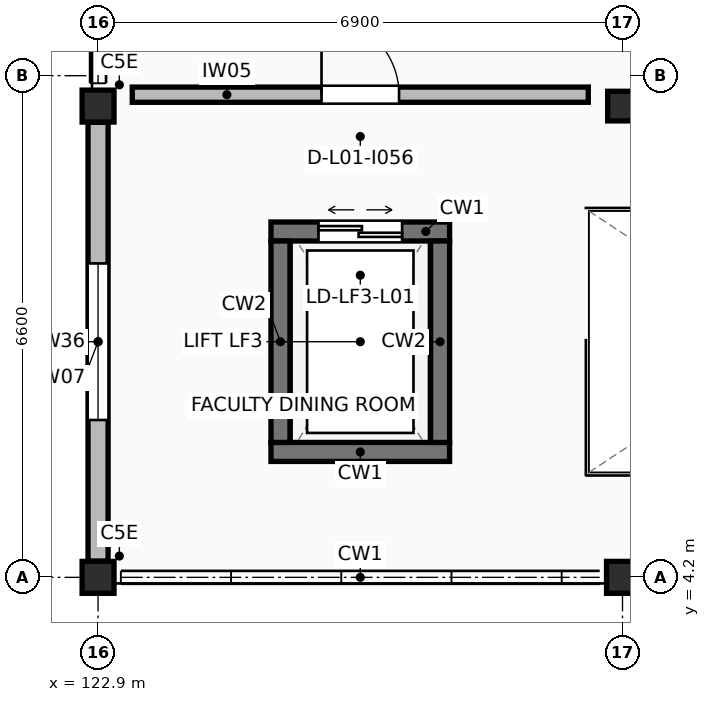
"""IFC4 building model, lengths in metres.
Left out: names, types, materials, properties, quantities, classifications, styles, units other than length and angle.
Written with IfcOpenShell. Run it as: python <this file> out.ifc"""

import sys

from ifc_helpers import new_model, si_unit, direction, frame, frame_2d, origin, origin_2d, place, context, subcontext, project, spatial, rectangle, extrude, element, fill, save


model = new_model("IFC4")
c1 = context("Model", 3, precision=1e-05, world=origin(), true_north=direction((0.0, 1.0)))
c2 = subcontext(c1, "Body", "Model", "MODEL_VIEW")
j1 = project(units=[si_unit("LENGTHUNIT", "METRE"), si_unit("PLANEANGLEUNIT", "RADIAN")], contexts=[c1])
p1 = place(None, origin())
s1 = spatial("IfcSite", under=j1, at=p1, CompositionType="ELEMENT")
p2 = place(p1, origin())
s2 = spatial("IfcBuilding", under=s1, at=p2, CompositionType="ELEMENT")
p3 = place(p2, frame((0.0, 0.0, 4.42)))
s3 = spatial("IfcBuildingStorey", under=s2, at=p3, CompositionType="ELEMENT", Elevation=4.42)
for number, where, z_axis, x_axis in (
    (1, (122.9, 4.2, 0.0), (0.0, 0.0, 1.0), (1.0, 0.0, 0.0)),
    (2, (122.9, 10.4, 0.0), (0.0, 0.0, 1.0), (1.0, 0.0, 0.0)),
    (3, (129.8, 4.2, 0.0), (0.0, 0.0, 1.0), (1.0, 0.0, 0.0)),
):
    element("IfcColumn", number, at=place(p3, frame(where, z_axis=z_axis, x_axis=x_axis)), inside=s3, PredefinedType="COLUMN", context=c2, shape_type="SweptSolid", body=[
        extrude(rectangle(XDim=0.42, YDim=0.42, at=origin_2d()), origin(), (0.0, 0.0, 1.0), 3.74),
    ])
p4 = place(p3, frame((129.8, 10.4, 0.0), z_axis=(0.0, 0.0, 1.0), x_axis=(1.0, 0.0, 0.0)))
e4 = element("IfcColumn", 4, at=p4, inside=s3, PredefinedType="COLUMN", context=c2, shape_type="SweptSolid", body=[
    extrude(rectangle(XDim=0.39, YDim=0.39, at=origin_2d()), origin(), (0.0, 0.0, 1.0), 3.74),
])
p5 = place(p3, frame((125.175, 8.75, 0.0), z_axis=(0.0, 0.0, 1.0), x_axis=(1.0, 0.0, 0.0)))
e5 = element("IfcWall", 5, at=p5, inside=s3, PredefinedType="SHEAR", context=c2, shape_type="SweptSolid", body=[
    extrude(rectangle(XDim=2.35, YDim=0.25, at=frame_2d((1.175, 0.0))), origin(), (0.0, 0.0, 1.0), 3.49),
])
p6 = place(p5, frame((0.625, 0.0, 0.0)))
e6 = element("IfcOpeningElement", 6, at=p6, cuts=e5, PredefinedType="OPENING", context=c2, shape_type="SweptSolid", body=[
    extrude(rectangle(XDim=1.1, YDim=2.15, at=frame_2d((0.55, 1.075))), frame((0.0, 0.135, 0.0), z_axis=(0.0, -1.0, 0.0), x_axis=(1.0, 0.0, 0.0)), (0.0, 0.0, 1.0), 0.27),
])
p7 = place(p3, frame((125.175, 5.85, 0.0), z_axis=(0.0, 0.0, 1.0), x_axis=(1.0, 0.0, 0.0)))
e7 = element("IfcWall", 7, at=p7, inside=s3, PredefinedType="SHEAR", context=c2, shape_type="SweptSolid", body=[
    extrude(rectangle(XDim=2.35, YDim=0.25, at=frame_2d((1.175, 0.0))), origin(), (0.0, 0.0, 1.0), 3.49),
])
for number, where, z_axis, x_axis in (
    (8, (125.3, 5.975, 0.0), (0.0, 0.0, 1.0), (0.0, 1.0, 0.0)),
    (9, (127.4, 5.975, 0.0), (0.0, 0.0, 1.0), (0.0, 1.0, 0.0)),
):
    element("IfcWall", number, at=place(p3, frame(where, z_axis=z_axis, x_axis=x_axis)), inside=s3, PredefinedType="SHEAR", context=c2, shape_type="SweptSolid", body=[
        extrude(rectangle(XDim=2.65, YDim=0.25, at=frame_2d((1.325, 0.0))), origin(), (0.0, 0.0, 1.0), 3.49),
    ])
p8 = place(p3, frame((122.9, 4.413, 0.0), z_axis=(0.0, 0.0, 1.0), x_axis=(0.0, 1.0, 0.0)))
e10 = element("IfcWall", 10, at=p8, inside=s3, PredefinedType="STANDARD", context=c2, shape_type="SweptSolid", body=[
    extrude(rectangle(XDim=5.774, YDim=0.264, at=frame_2d((2.887, 0.0))), origin(), (0.0, 0.0, 1.0), 2.78),
])
p9 = place(p8, frame((1.857, 0.0, 0.95)))
e11 = element("IfcOpeningElement", 11, at=p9, cuts=e10, PredefinedType="OPENING", context=c2, shape_type="SweptSolid", body=[
    extrude(rectangle(XDim=2.06, YDim=1.6, at=frame_2d((1.03, 0.8))), frame((0.0, 0.142, 0.0), z_axis=(0.0, -1.0, 0.0), x_axis=(1.0, 0.0, 0.0)), (0.0, 0.0, 1.0), 0.284),
])
p10 = place(p3, frame((123.35, 10.55, 0.0), z_axis=(0.0, 0.0, 1.0), x_axis=(1.0, 0.0, 0.0)))
e12 = element("IfcWall", 12, at=p10, inside=s3, PredefinedType="STANDARD", context=c2, shape_type="SweptSolid", body=[
    extrude(rectangle(XDim=6.0, YDim=0.2, at=frame_2d((3.0, 0.0))), origin(), (0.0, 0.0, 1.0), 2.75),
])
p11 = place(p10, frame((2.49, 0.0, 0.0)))
e13 = element("IfcOpeningElement", 13, at=p11, cuts=e12, PredefinedType="OPENING", context=c2, shape_type="SweptSolid", body=[
    extrude(rectangle(XDim=1.02, YDim=2.06, at=frame_2d((0.51, 1.03))), frame((0.0, 0.11, 0.0), z_axis=(0.0, -1.0, 0.0), x_axis=(1.0, 0.0, 0.0)), (0.0, 0.0, 1.0), 0.22),
])
p12 = place(p9, origin())
e14 = element("IfcWindow", 14, at=p12, inside=s3, PartitioningType="SINGLE_PANEL", PredefinedType="WINDOW", context=c2, shape_type="SweptSolid", body=[
    extrude(rectangle(XDim=2.06, YDim=1.6, at=frame_2d((1.03, 0.8))), frame((0.0, 0.03, 0.0), z_axis=(0.0, -1.0, 0.0), x_axis=(1.0, 0.0, 0.0)), (0.0, 0.0, 1.0), 0.06),
])
fill(e11, e14)
p13 = place(p6, origin())
e15 = element("IfcDoor", 15, at=p13, inside=s3, OperationType="DOUBLE_DOOR_SLIDING", PredefinedType="DOOR", context=c2, shape_type="SweptSolid", body=[
    extrude(rectangle(XDim=1.1, YDim=2.15, at=frame_2d((0.55, 1.075))), frame((0.0, 0.025, 0.0), z_axis=(0.0, -1.0, 0.0), x_axis=(1.0, 0.0, 0.0)), (0.0, 0.0, 1.0), 0.05),
])
fill(e6, e15)
p14 = place(p11, origin())
e16 = element("IfcDoor", 16, at=p14, inside=s3, OperationType="SINGLE_SWING_LEFT", PredefinedType="DOOR", context=c2, shape_type="SweptSolid", body=[
    extrude(rectangle(XDim=1.02, YDim=2.06, at=frame_2d((0.51, 1.03))), frame((0.0, 0.025, 0.0), z_axis=(0.0, -1.0, 0.0), x_axis=(1.0, 0.0, 0.0)), (0.0, 0.0, 1.0), 0.05),
])
fill(e13, e16)
save(model, sys.argv[1])
